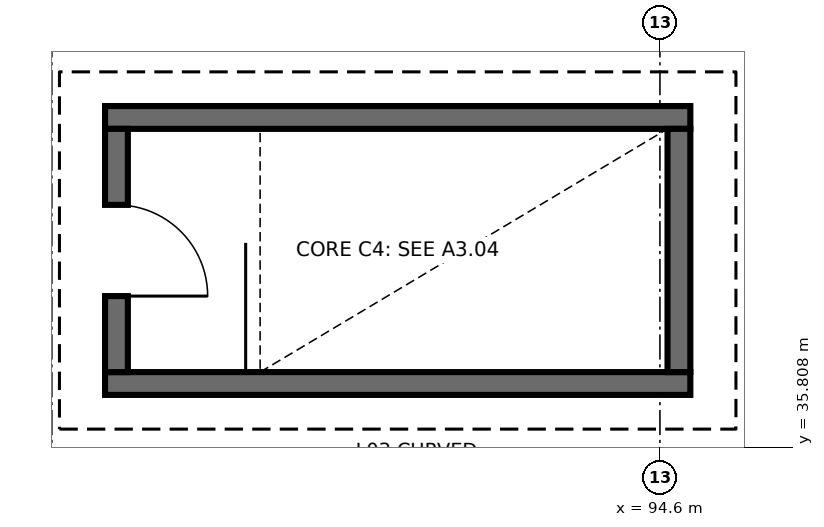
"""IFC4 building model, lengths in metres.
Left out: names, types, materials, properties, quantities, classifications, styles, units other than length and angle.
Written with IfcOpenShell. Run it as: python <this file> out.ifc"""

import sys

from ifc_helpers import new_model, si_unit, direction, frame, frame_2d, origin, place, context, subcontext, project, spatial, rectangle, extrude, element, fill, save


model = new_model("IFC4")
c1 = context("Model", 3, precision=1e-05, world=origin(), true_north=direction((0.0, 1.0)))
c2 = subcontext(c1, "Body", "Model", "MODEL_VIEW")
j1 = project(units=[si_unit("LENGTHUNIT", "METRE"), si_unit("PLANEANGLEUNIT", "RADIAN")], contexts=[c1])
p1 = place(None, origin())
s1 = spatial("IfcSite", under=j1, at=p1, CompositionType="ELEMENT")
p2 = place(p1, origin())
s2 = spatial("IfcBuilding", under=s1, at=p2, CompositionType="ELEMENT")
p3 = place(p2, frame((0.0, 0.0, 13.8)))
s3 = spatial("IfcBuildingStorey", under=s2, at=p3, CompositionType="ELEMENT", Elevation=13.8)
for number, where, z_axis, x_axis in (
    (1, (87.3, 36.65, 0.0), (0.0, 0.0, 1.0), (1.0, 0.0, 0.0)),
    (2, (95.0, 40.15, 0.0), (0.0, 0.0, 1.0), (-1.0, 0.0, 0.0)),
):
    element("IfcWall", number, at=place(p3, frame(where, z_axis=z_axis, x_axis=x_axis)), inside=s3, PredefinedType="SHEAR", context=c2, shape_type="SweptSolid", body=[
        extrude(rectangle(XDim=7.7, YDim=0.3, at=frame_2d((3.85, 0.0))), origin(), (0.0, 0.0, 1.0), 4.5),
    ])
p4 = place(p3, frame((87.45, 40.0, 0.0), z_axis=(0.0, 0.0, 1.0), x_axis=(0.0, -1.0, 0.0)))
e3 = element("IfcWall", 3, at=p4, inside=s3, PredefinedType="SHEAR", context=c2, shape_type="SweptSolid", body=[
    extrude(rectangle(XDim=3.2, YDim=0.3, at=frame_2d((1.6, 0.0))), origin(), (0.0, 0.0, 1.0), 4.5),
])
p5 = place(p4, frame((1.0, 0.0, 0.0)))
e4 = element("IfcOpeningElement", 4, at=p5, cuts=e3, PredefinedType="OPENING", context=c2, shape_type="SweptSolid", body=[
    extrude(rectangle(XDim=1.2, YDim=2.15, at=frame_2d((0.6, 1.075))), frame((0.0, 0.16, 0.0), z_axis=(0.0, -1.0, 0.0), x_axis=(1.0, 0.0, 0.0)), (0.0, 0.0, 1.0), 0.32),
])
p6 = place(p3, frame((94.85, 36.8, 0.0), z_axis=(0.0, 0.0, 1.0), x_axis=(0.0, 1.0, 0.0)))
e5 = element("IfcWall", 5, at=p6, inside=s3, PredefinedType="SHEAR", context=c2, shape_type="SweptSolid", body=[
    extrude(rectangle(XDim=3.2, YDim=0.3, at=frame_2d((1.6, 0.0))), origin(), (0.0, 0.0, 1.0), 4.5),
])
p7 = place(p5, origin())
e6 = element("IfcDoor", 6, at=p7, inside=s3, OperationType="SINGLE_SWING_RIGHT", PredefinedType="DOOR", context=c2, shape_type="SweptSolid", body=[
    extrude(rectangle(XDim=1.2, YDim=2.15, at=frame_2d((0.6, 1.075))), frame((0.0, 0.025, 0.0), z_axis=(0.0, -1.0, 0.0), x_axis=(1.0, 0.0, 0.0)), (0.0, 0.0, 1.0), 0.05),
])
fill(e4, e6)
save(model, sys.argv[1])
